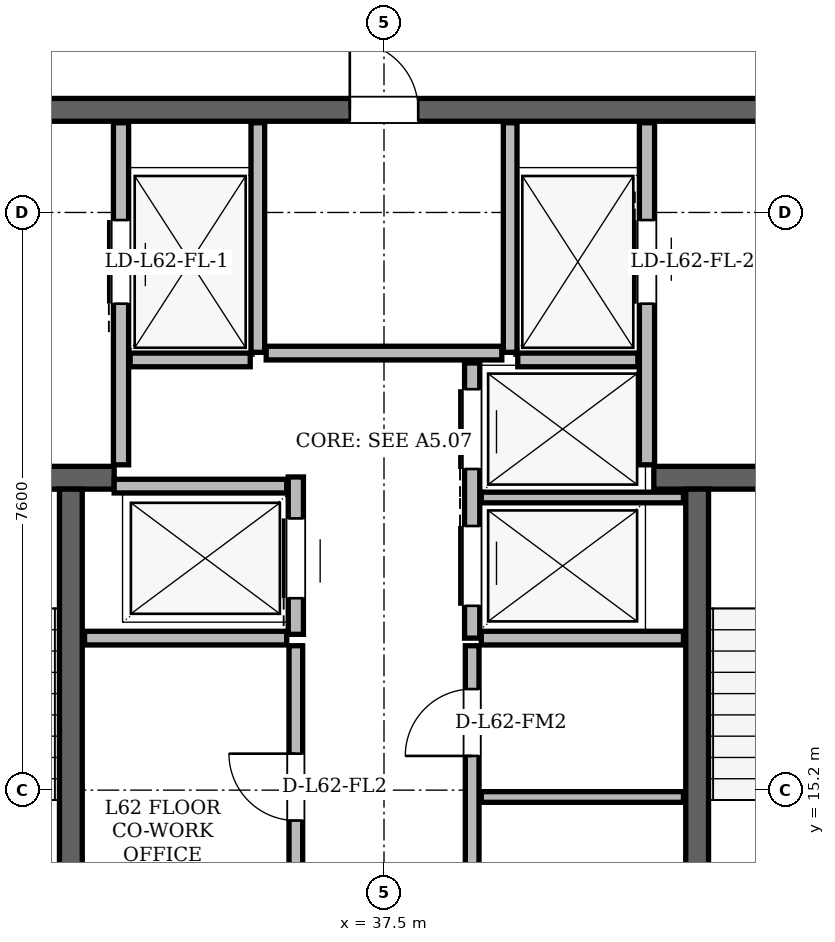
"""IFC4 building model, lengths in metres.
Left out: names, types, materials, properties, quantities, classifications, styles, units other than length and angle.
Written with IfcOpenShell. Run it as: python <this file> out.ifc"""

import sys

from ifc_helpers import new_model, si_unit, direction, frame, frame_2d, origin, place, context, subcontext, project, spatial, rectangle, extrude, element, fill, save


model = new_model("IFC4")
c1 = context("Model", 3, precision=1e-05, world=origin(), true_north=direction((0.0, 1.0)))
c2 = subcontext(c1, "Body", "Model", "MODEL_VIEW")
j1 = project(units=[si_unit("LENGTHUNIT", "METRE"), si_unit("PLANEANGLEUNIT", "RADIAN")], contexts=[c1])
p1 = place(None, origin())
s1 = spatial("IfcSite", under=j1, at=p1, CompositionType="ELEMENT")
p2 = place(p1, origin())
s2 = spatial("IfcBuilding", under=s1, at=p2, CompositionType="ELEMENT")
p3 = place(p2, frame((0.0, 0.0, 234.3)))
s3 = spatial("IfcBuildingStorey", under=s2, at=p3, CompositionType="ELEMENT", Elevation=234.3)
p4 = place(p3, frame((29.65, 24.15, 0.0), z_axis=(0.0, 0.0, 1.0), x_axis=(1.0, 0.0, 0.0)))
e1 = element("IfcWall", 1, at=p4, inside=s3, PredefinedType="SHEAR", context=c2, shape_type="SweptSolid", body=[
    extrude(rectangle(XDim=15.7, YDim=0.3, at=frame_2d((7.85, 0.0))), origin(), (0.0, 0.0, 1.0), 3.38),
])
p5 = place(p4, frame((1.7, 0.0, 0.0)))
e2 = element("IfcOpeningElement", 2, at=p5, cuts=e1, PredefinedType="OPENING", context=c2, shape_type="SweptSolid", body=[
    extrude(rectangle(XDim=1.2, YDim=2.2, at=frame_2d((0.6, 1.1))), frame((0.0, 0.15, 0.0), z_axis=(0.0, -1.0, 0.0), x_axis=(1.0, 0.0, 0.0)), (0.0, 0.0, 1.0), 0.3),
])
p6 = place(p4, frame((12.8, 0.0, 0.0)))
e3 = element("IfcOpeningElement", 3, at=p6, cuts=e1, PredefinedType="OPENING", context=c2, shape_type="SweptSolid", body=[
    extrude(rectangle(XDim=1.2, YDim=2.2, at=frame_2d((0.6, 1.1))), frame((0.0, 0.15, 0.0), z_axis=(0.0, -1.0, 0.0), x_axis=(1.0, 0.0, 0.0)), (0.0, 0.0, 1.0), 0.3),
])
p7 = place(p4, frame((7.4, 0.0, 0.0)))
e4 = element("IfcOpeningElement", 4, at=p7, cuts=e1, PredefinedType="OPENING", context=c2, shape_type="SweptSolid", body=[
    extrude(rectangle(XDim=0.9, YDim=2.05, at=frame_2d((0.45, 1.025))), frame((0.0, 0.15, 0.0), z_axis=(0.0, -1.0, 0.0), x_axis=(1.0, 0.0, 0.0)), (0.0, 0.0, 1.0), 0.3),
])
p8 = place(p3, frame((29.94, 19.31, 0.0), z_axis=(0.0, 0.0, 1.0), x_axis=(1.0, 0.0, 0.0)))
e5 = element("IfcWall", 5, at=p8, inside=s3, PredefinedType="SHEAR", context=c2, shape_type="SweptSolid", body=[
    extrude(rectangle(XDim=4.01, YDim=0.3, at=frame_2d((2.005, 0.0))), origin(), (0.0, 0.0, 1.0), 3.38),
])
p9 = place(p8, frame((1.01, 0.0, 0.0)))
e6 = element("IfcOpeningElement", 6, at=p9, cuts=e5, PredefinedType="OPENING", context=c2, shape_type="SweptSolid", body=[
    extrude(rectangle(XDim=1.4, YDim=2.2, at=frame_2d((0.7, 1.1))), frame((0.0, 0.15, 0.0), z_axis=(0.0, -1.0, 0.0), x_axis=(1.0, 0.0, 0.0)), (0.0, 0.0, 1.0), 0.3),
])
p10 = place(p3, frame((41.05, 19.31, 0.0), z_axis=(0.0, 0.0, 1.0), x_axis=(1.0, 0.0, 0.0)))
e7 = element("IfcWall", 7, at=p10, inside=s3, PredefinedType="SHEAR", context=c2, shape_type="SweptSolid", body=[
    extrude(rectangle(XDim=4.01, YDim=0.3, at=frame_2d((2.005, 0.0))), origin(), (0.0, 0.0, 1.0), 3.38),
])
p11 = place(p10, frame((1.6, 0.0, 0.0)))
e8 = element("IfcOpeningElement", 8, at=p11, cuts=e7, PredefinedType="OPENING", context=c2, shape_type="SweptSolid", body=[
    extrude(rectangle(XDim=1.4, YDim=2.2, at=frame_2d((0.7, 1.1))), frame((0.0, 0.15, 0.0), z_axis=(0.0, -1.0, 0.0), x_axis=(1.0, 0.0, 0.0)), (0.0, 0.0, 1.0), 0.3),
])
for number, where, z_axis, x_axis in (
    (9, (33.38, 11.54, 0.0), (0.0, 0.0, 1.0), (0.0, 1.0, 0.0)),
    (10, (41.62, 11.54, 0.0), (0.0, 0.0, 1.0), (0.0, 1.0, 0.0)),
):
    element("IfcWall", number, at=place(p3, frame(where, z_axis=z_axis, x_axis=x_axis)), inside=s3, PredefinedType="SHEAR", context=c2, shape_type="SweptSolid", body=[
        extrude(rectangle(XDim=7.62, YDim=0.3, at=frame_2d((3.81, 0.0))), origin(), (0.0, 0.0, 1.0), 3.38),
    ])
p12 = place(p3, frame((58.942, 11.205, 0.0), z_axis=(0.0, 0.0, 1.0), x_axis=(-0.500000614513, 0.866025048995, 0.0)))
e11 = element("IfcWall", 11, at=p12, inside=s3, PredefinedType="SOLIDWALL", context=c2, shape_type="SweptSolid", body=[
    extrude(rectangle(XDim=36.848, YDim=0.29, at=frame_2d((18.424, 0.0))), origin(), (0.0, 0.0, 1.0), 2.677),
])
p13 = place(p12, frame((7.615, 0.0, 0.0)))
e12 = element("IfcOpeningElement", 12, at=p13, cuts=e11, PredefinedType="OPENING", context=c2, shape_type="SweptSolid", body=[
    extrude(rectangle(XDim=1.5, YDim=2.2, at=frame_2d((0.75, 1.1))), frame((0.0, 0.145, 0.0), z_axis=(0.0, -1.0, 0.0), x_axis=(1.0, 0.0, 0.0)), (0.0, 0.0, 1.0), 0.29),
])
p14 = place(p12, frame((28.658, 0.0, 0.0)))
e13 = element("IfcOpeningElement", 13, at=p14, cuts=e11, PredefinedType="OPENING", context=c2, shape_type="SweptSolid", body=[
    extrude(rectangle(XDim=1.3, YDim=2.2, at=frame_2d((0.65, 1.1))), frame((0.0, 0.145, 0.0), z_axis=(0.0, -1.0, 0.0), x_axis=(1.0, 0.0, 0.0)), (0.0, 0.0, 1.0), 0.29),
])
p15 = place(p12, frame((3.643, 0.0, 0.85)))
e14 = element("IfcOpeningElement", 14, at=p15, cuts=e11, PredefinedType="OPENING", context=c2, shape_type="SweptSolid", body=[
    extrude(rectangle(XDim=1.2, YDim=1.48, at=frame_2d((0.6, 0.74))), frame((0.0, 0.145, 0.0), z_axis=(0.0, -1.0, 0.0), x_axis=(1.0, 0.0, 0.0)), (0.0, 0.0, 1.0), 0.29),
])
p16 = place(p12, frame((1.09, 0.0, 0.85)))
e15 = element("IfcOpeningElement", 15, at=p16, cuts=e11, PredefinedType="OPENING", context=c2, shape_type="SweptSolid", body=[
    extrude(rectangle(XDim=1.6, YDim=1.7, at=frame_2d((0.8, 0.85))), frame((0.0, 0.145, 0.0), z_axis=(0.0, -1.0, 0.0), x_axis=(1.0, 0.0, 0.0)), (0.0, 0.0, 1.0), 0.29),
])
p17 = place(p12, frame((34.714, 0.0, 0.85)))
e16 = element("IfcOpeningElement", 16, at=p17, cuts=e11, PredefinedType="OPENING", context=c2, shape_type="SweptSolid", body=[
    extrude(rectangle(XDim=1.2, YDim=1.48, at=frame_2d((0.6, 0.74))), frame((0.0, 0.145, 0.0), z_axis=(0.0, -1.0, 0.0), x_axis=(1.0, 0.0, 0.0)), (0.0, 0.0, 1.0), 0.29),
])
p18 = place(p12, frame((31.648, 0.0, 0.85)))
e17 = element("IfcOpeningElement", 17, at=p18, cuts=e11, PredefinedType="OPENING", context=c2, shape_type="SweptSolid", body=[
    extrude(rectangle(XDim=1.2, YDim=1.48, at=frame_2d((0.6, 0.74))), frame((0.0, 0.145, 0.0), z_axis=(0.0, -1.0, 0.0), x_axis=(1.0, 0.0, 0.0)), (0.0, 0.0, 1.0), 0.29),
])
p19 = place(p12, frame((16.738, 0.0, 0.85)))
e18 = element("IfcOpeningElement", 18, at=p19, cuts=e11, PredefinedType="OPENING", context=c2, shape_type="SweptSolid", body=[
    extrude(rectangle(XDim=2.2, YDim=1.717, at=frame_2d((1.1, 0.858))), frame((0.0, 0.145, 0.0), z_axis=(0.0, -1.0, 0.0), x_axis=(1.0, 0.0, 0.0)), (0.0, 0.0, 1.0), 0.29),
])
p20 = place(p12, frame((22.794, 0.0, 0.85)))
e19 = element("IfcOpeningElement", 19, at=p20, cuts=e11, PredefinedType="OPENING", context=c2, shape_type="SweptSolid", body=[
    extrude(rectangle(XDim=1.6, YDim=1.7, at=frame_2d((0.8, 0.85))), frame((0.0, 0.145, 0.0), z_axis=(0.0, -1.0, 0.0), x_axis=(1.0, 0.0, 0.0)), (0.0, 0.0, 1.0), 0.29),
])
p21 = place(p12, frame((12.349, 0.0, 0.85)))
e20 = element("IfcOpeningElement", 20, at=p21, cuts=e11, PredefinedType="OPENING", context=c2, shape_type="SweptSolid", body=[
    extrude(rectangle(XDim=1.2, YDim=1.48, at=frame_2d((0.6, 0.74))), frame((0.0, 0.145, 0.0), z_axis=(0.0, -1.0, 0.0), x_axis=(1.0, 0.0, 0.0)), (0.0, 0.0, 1.0), 0.29),
])
p22 = place(p3, frame((34.482, 43.116, 0.0), z_axis=(0.0, 0.0, 1.0), x_axis=(-0.500000614513, -0.866025048995, 0.0)))
e21 = element("IfcWall", 21, at=p22, inside=s3, PredefinedType="SOLIDWALL", context=c2, shape_type="SweptSolid", body=[
    extrude(rectangle(XDim=36.848, YDim=0.29, at=frame_2d((18.424, 0.0))), origin(), (0.0, 0.0, 1.0), 2.677),
])
p23 = place(p22, frame((8.034, 0.0, 0.0)))
e22 = element("IfcOpeningElement", 22, at=p23, cuts=e21, PredefinedType="OPENING", context=c2, shape_type="SweptSolid", body=[
    extrude(rectangle(XDim=1.5, YDim=2.2, at=frame_2d((0.75, 1.1))), frame((0.0, 0.145, 0.0), z_axis=(0.0, -1.0, 0.0), x_axis=(1.0, 0.0, 0.0)), (0.0, 0.0, 1.0), 0.29),
])
p24 = place(p22, frame((28.559, 0.0, 0.0)))
e23 = element("IfcOpeningElement", 23, at=p24, cuts=e21, PredefinedType="OPENING", context=c2, shape_type="SweptSolid", body=[
    extrude(rectangle(XDim=1.5, YDim=2.2, at=frame_2d((0.75, 1.1))), frame((0.0, 0.145, 0.0), z_axis=(0.0, -1.0, 0.0), x_axis=(1.0, 0.0, 0.0)), (0.0, 0.0, 1.0), 0.29),
])
p25 = place(p22, frame((21.863, 0.0, 0.85)))
e24 = element("IfcOpeningElement", 24, at=p25, cuts=e21, PredefinedType="OPENING", context=c2, shape_type="SweptSolid", body=[
    extrude(rectangle(XDim=2.4, YDim=1.717, at=frame_2d((1.2, 0.858))), frame((0.0, 0.145, 0.0), z_axis=(0.0, -1.0, 0.0), x_axis=(1.0, 0.0, 0.0)), (0.0, 0.0, 1.0), 0.29),
])
p26 = place(p22, frame((34.677, 0.0, 0.85)))
e25 = element("IfcOpeningElement", 25, at=p26, cuts=e21, PredefinedType="OPENING", context=c2, shape_type="SweptSolid", body=[
    extrude(rectangle(XDim=1.2, YDim=1.48, at=frame_2d((0.6, 0.74))), frame((0.0, 0.145, 0.0), z_axis=(0.0, -1.0, 0.0), x_axis=(1.0, 0.0, 0.0)), (0.0, 0.0, 1.0), 0.29),
])
p27 = place(p22, frame((32.477, 0.0, 0.85)))
e26 = element("IfcOpeningElement", 26, at=p27, cuts=e21, PredefinedType="OPENING", context=c2, shape_type="SweptSolid", body=[
    extrude(rectangle(XDim=1.4, YDim=1.6, at=frame_2d((0.7, 0.8))), frame((0.0, 0.145, 0.0), z_axis=(0.0, -1.0, 0.0), x_axis=(1.0, 0.0, 0.0)), (0.0, 0.0, 1.0), 0.29),
])
p28 = place(p22, frame((12.14, 0.0, 0.85)))
e27 = element("IfcOpeningElement", 27, at=p28, cuts=e21, PredefinedType="OPENING", context=c2, shape_type="SweptSolid", body=[
    extrude(rectangle(XDim=1.2, YDim=1.48, at=frame_2d((0.6, 0.74))), frame((0.0, 0.145, 0.0), z_axis=(0.0, -1.0, 0.0), x_axis=(1.0, 0.0, 0.0)), (0.0, 0.0, 1.0), 0.29),
])
p29 = place(p22, frame((16.54, 0.0, 0.85)))
e28 = element("IfcOpeningElement", 28, at=p29, cuts=e21, PredefinedType="OPENING", context=c2, shape_type="SweptSolid", body=[
    extrude(rectangle(XDim=2.0, YDim=1.717, at=frame_2d((1.0, 0.858))), frame((0.0, 0.145, 0.0), z_axis=(0.0, -1.0, 0.0), x_axis=(1.0, 0.0, 0.0)), (0.0, 0.0, 1.0), 0.29),
])
p30 = place(p22, frame((2.059, 0.0, 0.85)))
e29 = element("IfcOpeningElement", 29, at=p30, cuts=e21, PredefinedType="OPENING", context=c2, shape_type="SweptSolid", body=[
    extrude(rectangle(XDim=1.2, YDim=1.48, at=frame_2d((0.6, 0.74))), frame((0.0, 0.145, 0.0), z_axis=(0.0, -1.0, 0.0), x_axis=(1.0, 0.0, 0.0)), (0.0, 0.0, 1.0), 0.29),
])
p31 = place(p3, frame((34.04, 19.48, 0.0), z_axis=(0.0, 0.0, 1.0), x_axis=(0.0, 1.0, 0.0)))
e30 = element("IfcWall", 30, at=p31, inside=s3, PredefinedType="PARTITIONING", context=c2, shape_type="SweptSolid", body=[
    extrude(rectangle(XDim=4.5, YDim=0.2, at=frame_2d((2.25, 0.0))), origin(), (0.0, 0.0, 1.0), 3.38),
])
p32 = place(p31, frame((2.12, 0.0, 0.0)))
e31 = element("IfcOpeningElement", 31, at=p32, cuts=e30, PredefinedType="OPENING", context=c2, shape_type="SweptSolid", body=[
    extrude(rectangle(XDim=1.1, YDim=2.2, at=frame_2d((0.55, 1.1))), frame((0.0, 0.1, 0.0), z_axis=(0.0, -1.0, 0.0), x_axis=(1.0, 0.0, 0.0)), (0.0, 0.0, 1.0), 0.2),
])
p33 = place(p3, frame((35.84, 20.96, 0.0), z_axis=(0.0, 0.0, 1.0), x_axis=(0.0, 1.0, 0.0)))
e32 = element("IfcWall", 32, at=p33, inside=s3, PredefinedType="PARTITIONING", context=c2, shape_type="SweptSolid", body=[
    extrude(rectangle(XDim=3.02, YDim=0.18, at=frame_2d((1.51, 0.0))), origin(), (0.0, 0.0, 1.0), 3.38),
])
p34 = place(p3, frame((34.16, 20.86, 0.0), z_axis=(0.0, 0.0, 1.0), x_axis=(1.0, 0.0, 0.0)))
e33 = element("IfcWall", 33, at=p34, inside=s3, PredefinedType="PARTITIONING", context=c2, shape_type="SweptSolid", body=[
    extrude(rectangle(XDim=1.58, YDim=0.18, at=frame_2d((0.79, 0.0))), origin(), (0.0, 0.0, 1.0), 3.38),
])
p35 = place(p3, frame((40.96, 19.48, 0.0), z_axis=(0.0, 0.0, 1.0), x_axis=(0.0, 1.0, 0.0)))
e34 = element("IfcWall", 34, at=p35, inside=s3, PredefinedType="PARTITIONING", context=c2, shape_type="SweptSolid", body=[
    extrude(rectangle(XDim=4.5, YDim=0.2, at=frame_2d((2.25, 0.0))), origin(), (0.0, 0.0, 1.0), 3.38),
])
p36 = place(p35, frame((2.12, 0.0, 0.0)))
e35 = element("IfcOpeningElement", 35, at=p36, cuts=e34, PredefinedType="OPENING", context=c2, shape_type="SweptSolid", body=[
    extrude(rectangle(XDim=1.1, YDim=2.2, at=frame_2d((0.55, 1.1))), frame((0.0, 0.1, 0.0), z_axis=(0.0, -1.0, 0.0), x_axis=(1.0, 0.0, 0.0)), (0.0, 0.0, 1.0), 0.2),
])
p37 = place(p3, frame((39.16, 20.96, 0.0), z_axis=(0.0, 0.0, 1.0), x_axis=(0.0, 1.0, 0.0)))
e36 = element("IfcWall", 36, at=p37, inside=s3, PredefinedType="PARTITIONING", context=c2, shape_type="SweptSolid", body=[
    extrude(rectangle(XDim=3.02, YDim=0.18, at=frame_2d((1.51, 0.0))), origin(), (0.0, 0.0, 1.0), 3.38),
])
p38 = place(p3, frame((39.26, 20.86, 0.0), z_axis=(0.0, 0.0, 1.0), x_axis=(1.0, 0.0, 0.0)))
e37 = element("IfcWall", 37, at=p38, inside=s3, PredefinedType="PARTITIONING", context=c2, shape_type="SweptSolid", body=[
    extrude(rectangle(XDim=1.58, YDim=0.18, at=frame_2d((0.79, 0.0))), origin(), (0.0, 0.0, 1.0), 3.38),
])
p39 = place(p3, frame((36.34, 17.25, 0.0), z_axis=(0.0, 0.0, 1.0), x_axis=(0.0, 1.0, 0.0)))
e38 = element("IfcWall", 38, at=p39, inside=s3, PredefinedType="PARTITIONING", context=c2, shape_type="SweptSolid", body=[
    extrude(rectangle(XDim=2.07, YDim=0.2, at=frame_2d((1.035, 0.0))), origin(), (0.0, 0.0, 1.0), 3.38),
])
p40 = place(p39, frame((0.475, 0.0, 0.0)))
e39 = element("IfcOpeningElement", 39, at=p40, cuts=e38, PredefinedType="OPENING", context=c2, shape_type="SweptSolid", body=[
    extrude(rectangle(XDim=1.05, YDim=2.15, at=frame_2d((0.525, 1.075))), frame((0.0, 0.1, 0.0), z_axis=(0.0, -1.0, 0.0), x_axis=(1.0, 0.0, 0.0)), (0.0, 0.0, 1.0), 0.2),
])
p41 = place(p3, frame((33.95, 19.2, 0.0), z_axis=(0.0, 0.0, 1.0), x_axis=(1.0, 0.0, 0.0)))
e40 = element("IfcWall", 40, at=p41, inside=s3, PredefinedType="PARTITIONING", context=c2, shape_type="SweptSolid", body=[
    extrude(rectangle(XDim=2.27, YDim=0.18, at=frame_2d((1.135, 0.0))), origin(), (0.0, 0.0, 1.0), 3.38),
])
p42 = place(p3, frame((33.56, 17.2, 0.0), z_axis=(0.0, 0.0, 1.0), x_axis=(1.0, 0.0, 0.0)))
e41 = element("IfcWall", 41, at=p42, inside=s3, PredefinedType="PARTITIONING", context=c2, shape_type="SweptSolid", body=[
    extrude(rectangle(XDim=2.66, YDim=0.18, at=frame_2d((1.33, 0.0))), origin(), (0.0, 0.0, 1.0), 3.38),
])
p43 = place(p3, frame((36.34, 11.55, 0.0), z_axis=(0.0, 0.0, 1.0), x_axis=(0.0, 1.0, 0.0)))
e42 = element("IfcWall", 42, at=p43, inside=s3, PredefinedType="PARTITIONING", context=c2, shape_type="SweptSolid", body=[
    extrude(rectangle(XDim=5.55, YDim=0.18, at=frame_2d((2.775, 0.0))), origin(), (0.0, 0.0, 1.0), 3.38),
])
p44 = place(p43, frame((0.55, 0.0, 0.0)))
e43 = element("IfcOpeningElement", 43, at=p44, cuts=e42, PredefinedType="OPENING", context=c2, shape_type="SweptSolid", body=[
    extrude(rectangle(XDim=0.88, YDim=2.08, at=frame_2d((0.44, 1.04))), frame((0.0, 0.09, 0.0), z_axis=(0.0, -1.0, 0.0), x_axis=(1.0, 0.0, 0.0)), (0.0, 0.0, 1.0), 0.18),
])
p45 = place(p43, frame((3.25, 0.0, 0.0)))
e44 = element("IfcOpeningElement", 44, at=p45, cuts=e42, PredefinedType="OPENING", context=c2, shape_type="SweptSolid", body=[
    extrude(rectangle(XDim=0.88, YDim=2.08, at=frame_2d((0.44, 1.04))), frame((0.0, 0.09, 0.0), z_axis=(0.0, -1.0, 0.0), x_axis=(1.0, 0.0, 0.0)), (0.0, 0.0, 1.0), 0.18),
])
p46 = place(p3, frame((38.66, 17.2, 0.0), z_axis=(0.0, 0.0, 1.0), x_axis=(0.0, 1.0, 0.0)))
e45 = element("IfcWall", 45, at=p46, inside=s3, PredefinedType="PARTITIONING", context=c2, shape_type="SweptSolid", body=[
    extrude(rectangle(XDim=3.62, YDim=0.2, at=frame_2d((1.81, 0.0))), origin(), (0.0, 0.0, 1.0), 3.38),
])
p47 = place(p46, frame((0.425, 0.0, 0.0)))
e46 = element("IfcOpeningElement", 46, at=p47, cuts=e45, PredefinedType="OPENING", context=c2, shape_type="SweptSolid", body=[
    extrude(rectangle(XDim=1.05, YDim=2.15, at=frame_2d((0.525, 1.075))), frame((0.0, 0.1, 0.0), z_axis=(0.0, -1.0, 0.0), x_axis=(1.0, 0.0, 0.0)), (0.0, 0.0, 1.0), 0.2),
])
p48 = place(p46, frame((2.225, 0.0, 0.0)))
e47 = element("IfcOpeningElement", 47, at=p48, cuts=e45, PredefinedType="OPENING", context=c2, shape_type="SweptSolid", body=[
    extrude(rectangle(XDim=1.05, YDim=2.15, at=frame_2d((0.525, 1.075))), frame((0.0, 0.1, 0.0), z_axis=(0.0, -1.0, 0.0), x_axis=(1.0, 0.0, 0.0)), (0.0, 0.0, 1.0), 0.2),
])
p49 = place(p3, frame((38.78, 17.2, 0.0), z_axis=(0.0, 0.0, 1.0), x_axis=(1.0, 0.0, 0.0)))
e48 = element("IfcWall", 48, at=p49, inside=s3, PredefinedType="PARTITIONING", context=c2, shape_type="SweptSolid", body=[
    extrude(rectangle(XDim=2.66, YDim=0.18, at=frame_2d((1.33, 0.0))), origin(), (0.0, 0.0, 1.0), 3.38),
])
p50 = place(p3, frame((38.78, 19.05, 0.0), z_axis=(0.0, 0.0, 1.0), x_axis=(1.0, 0.0, 0.0)))
e49 = element("IfcWall", 49, at=p50, inside=s3, PredefinedType="PARTITIONING", context=c2, shape_type="SweptSolid", body=[
    extrude(rectangle(XDim=2.66, YDim=0.14, at=frame_2d((1.33, 0.0))), origin(), (0.0, 0.0, 1.0), 3.38),
])
p51 = place(p3, frame((38.66, 11.55, 0.0), z_axis=(0.0, 0.0, 1.0), x_axis=(0.0, 1.0, 0.0)))
e50 = element("IfcWall", 50, at=p51, inside=s3, PredefinedType="PARTITIONING", context=c2, shape_type="SweptSolid", body=[
    extrude(rectangle(XDim=5.55, YDim=0.18, at=frame_2d((2.775, 0.0))), origin(), (0.0, 0.0, 1.0), 3.38),
])
p52 = place(p51, frame((1.35, 0.0, 0.0)))
e51 = element("IfcOpeningElement", 51, at=p52, cuts=e50, PredefinedType="OPENING", context=c2, shape_type="SweptSolid", body=[
    extrude(rectangle(XDim=0.88, YDim=2.08, at=frame_2d((0.44, 1.04))), frame((0.0, 0.09, 0.0), z_axis=(0.0, -1.0, 0.0), x_axis=(1.0, 0.0, 0.0)), (0.0, 0.0, 1.0), 0.18),
])
p53 = place(p51, frame((4.1, 0.0, 0.0)))
e52 = element("IfcOpeningElement", 52, at=p53, cuts=e50, PredefinedType="OPENING", context=c2, shape_type="SweptSolid", body=[
    extrude(rectangle(XDim=0.88, YDim=2.08, at=frame_2d((0.44, 1.04))), frame((0.0, 0.09, 0.0), z_axis=(0.0, -1.0, 0.0), x_axis=(1.0, 0.0, 0.0)), (0.0, 0.0, 1.0), 0.18),
])
p54 = place(p3, frame((38.78, 15.11, 0.0), z_axis=(0.0, 0.0, 1.0), x_axis=(1.0, 0.0, 0.0)))
e53 = element("IfcWall", 53, at=p54, inside=s3, PredefinedType="PARTITIONING", context=c2, shape_type="SweptSolid", body=[
    extrude(rectangle(XDim=2.66, YDim=0.14, at=frame_2d((1.33, 0.0))), origin(), (0.0, 0.0, 1.0), 3.38),
])
p55 = place(p3, frame((35.95, 20.95, 0.0), z_axis=(0.0, 0.0, 1.0), x_axis=(1.0, 0.0, 0.0)))
e54 = element("IfcWall", 54, at=p55, inside=s3, PredefinedType="PARTITIONING", context=c2, shape_type="SweptSolid", body=[
    extrude(rectangle(XDim=3.1, YDim=0.18, at=frame_2d((1.55, 0.0))), origin(), (0.0, 0.0, 1.0), 3.38),
])
p56 = place(p45, origin())
e55 = element("IfcDoor", 55, at=p56, inside=s3, OperationType="SINGLE_SWING_RIGHT", PredefinedType="DOOR", context=c2, shape_type="SweptSolid", body=[
    extrude(rectangle(XDim=0.88, YDim=2.08, at=frame_2d((0.44, 1.04))), frame((0.0, 0.025, 0.0), z_axis=(0.0, -1.0, 0.0), x_axis=(1.0, 0.0, 0.0)), (0.0, 0.0, 1.0), 0.05),
])
fill(e44, e55)
p57 = place(p53, origin())
e56 = element("IfcDoor", 56, at=p57, inside=s3, OperationType="SINGLE_SWING_LEFT", PredefinedType="DOOR", context=c2, shape_type="SweptSolid", body=[
    extrude(rectangle(XDim=0.88, YDim=2.08, at=frame_2d((0.44, 1.04))), frame((0.0, 0.025, 0.0), z_axis=(0.0, -1.0, 0.0), x_axis=(1.0, 0.0, 0.0)), (0.0, 0.0, 1.0), 0.05),
])
fill(e52, e56)
p58 = place(p32, origin())
e57 = element("IfcDoor", 57, at=p58, inside=s3, OperationType="SLIDING_TO_LEFT", PredefinedType="DOOR", context=c2, shape_type="SweptSolid", body=[
    extrude(rectangle(XDim=1.1, YDim=2.2, at=frame_2d((0.55, 1.1))), frame((0.0, 0.025, 0.0), z_axis=(0.0, -1.0, 0.0), x_axis=(1.0, 0.0, 0.0)), (0.0, 0.0, 1.0), 0.05),
])
fill(e31, e57)
p59 = place(p36, origin())
e58 = element("IfcDoor", 58, at=p59, inside=s3, OperationType="SLIDING_TO_RIGHT", PredefinedType="DOOR", context=c2, shape_type="SweptSolid", body=[
    extrude(rectangle(XDim=1.1, YDim=2.2, at=frame_2d((0.55, 1.1))), frame((0.0, 0.025, 0.0), z_axis=(0.0, -1.0, 0.0), x_axis=(1.0, 0.0, 0.0)), (0.0, 0.0, 1.0), 0.05),
])
fill(e35, e58)
p60 = place(p40, origin())
e59 = element("IfcDoor", 59, at=p60, inside=s3, OperationType="SLIDING_TO_LEFT", PredefinedType="DOOR", context=c2, shape_type="SweptSolid", body=[
    extrude(rectangle(XDim=1.05, YDim=2.15, at=frame_2d((0.525, 1.075))), frame((0.0, 0.025, 0.0), z_axis=(0.0, -1.0, 0.0), x_axis=(1.0, 0.0, 0.0)), (0.0, 0.0, 1.0), 0.05),
])
fill(e39, e59)
p61 = place(p47, origin())
e60 = element("IfcDoor", 60, at=p61, inside=s3, OperationType="SLIDING_TO_RIGHT", PredefinedType="DOOR", context=c2, shape_type="SweptSolid", body=[
    extrude(rectangle(XDim=1.05, YDim=2.15, at=frame_2d((0.525, 1.075))), frame((0.0, 0.025, 0.0), z_axis=(0.0, -1.0, 0.0), x_axis=(1.0, 0.0, 0.0)), (0.0, 0.0, 1.0), 0.05),
])
fill(e46, e60)
p62 = place(p48, origin())
e61 = element("IfcDoor", 61, at=p62, inside=s3, OperationType="SLIDING_TO_LEFT", PredefinedType="DOOR", context=c2, shape_type="SweptSolid", body=[
    extrude(rectangle(XDim=1.05, YDim=2.15, at=frame_2d((0.525, 1.075))), frame((0.0, 0.025, 0.0), z_axis=(0.0, -1.0, 0.0), x_axis=(1.0, 0.0, 0.0)), (0.0, 0.0, 1.0), 0.05),
])
fill(e47, e61)
p63 = place(p7, origin())
e62 = element("IfcDoor", 62, at=p63, inside=s3, OperationType="SINGLE_SWING_LEFT", PredefinedType="DOOR", context=c2, shape_type="SweptSolid", body=[
    extrude(rectangle(XDim=0.9, YDim=2.05, at=frame_2d((0.45, 1.025))), frame((0.0, 0.025, 0.0), z_axis=(0.0, -1.0, 0.0), x_axis=(1.0, 0.0, 0.0)), (0.0, 0.0, 1.0), 0.05),
])
fill(e4, e62)
save(model, sys.argv[1])
